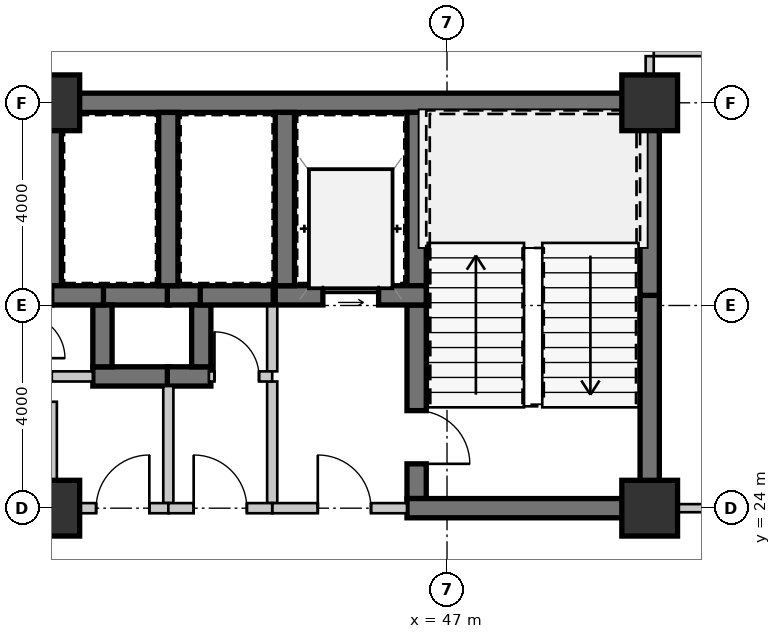
"""IFC4 building model, lengths in metres.
Left out: names, types, materials, properties, quantities, classifications, styles, units other than length and angle.
Written with IfcOpenShell. Run it as: python <this file> out.ifc"""

import sys

from ifc_helpers import new_model, si_unit, direction, frame, frame_2d, origin, origin_2d, place, context, subcontext, project, spatial, rectangle, extrude, source, transform, mapped, element, fill, save


model = new_model("IFC4")
c1 = context("Model", 3, precision=1e-05, world=origin(), true_north=direction((0.0, 1.0)))
c2 = subcontext(c1, "Body", "Model", "MODEL_VIEW")
j1 = project(units=[si_unit("LENGTHUNIT", "METRE"), si_unit("PLANEANGLEUNIT", "RADIAN")], contexts=[c1])
p1 = place(None, origin())
s1 = spatial("IfcSite", under=j1, at=p1, CompositionType="ELEMENT")
p2 = place(p1, origin())
s2 = spatial("IfcBuilding", under=s1, at=p2, CompositionType="ELEMENT")
p3 = place(p2, frame((0.0, 0.0, 12.95)))
s3 = spatial("IfcBuildingStorey", under=s2, at=p3, CompositionType="ELEMENT", Elevation=12.95)
m1 = source(origin(), c2, "Body", "SweptSolid", [
    extrude(rectangle(XDim=1.1, YDim=1.1, at=origin_2d()), origin(), (0.0, 0.0, 1.0), 3.85),
])
for number, where, z_axis, x_axis in (
    (1, (39.2, 24.0, 0.0), (0.0, 0.0, 1.0), (1.0, 0.0, 0.0)),
    (2, (51.0, 24.0, 0.0), (0.0, 0.0, 1.0), (1.0, 0.0, 0.0)),
    (3, (39.2, 32.0, 0.0), (0.0, 0.0, 1.0), (1.0, 0.0, 0.0)),
    (4, (51.0, 32.0, 0.0), (0.0, 0.0, 1.0), (1.0, 0.0, 0.0)),
):
    element("IfcColumn", number, at=place(p3, frame(where, z_axis=z_axis, x_axis=x_axis)), inside=s3, PredefinedType="COLUMN", context=c2, shape_type="MappedRepresentation", body=[
        mapped(m1, transform((0.0, 0.0, 0.0), scale=1.0)),
    ])
m2 = source(origin(), c2, "Body", "SweptSolid", [
    extrude(rectangle(XDim=11.2, YDim=0.38, at=frame_2d((5.6, 0.0))), origin(), (0.0, 0.0, 1.0), 3.43),
])
p4 = place(p3, frame((28.0, 32.0, 0.0), z_axis=(0.0, 0.0, 1.0), x_axis=(1.0, 0.0, 0.0)))
e5 = element("IfcWall", 5, at=p4, inside=s3, PredefinedType="SHEAR", context=c2, shape_type="MappedRepresentation", body=[
    mapped(m2, transform((0.0, 0.0, 0.0), scale=1.0)),
])
m3 = source(origin(), c2, "Body", "SweptSolid", [
    extrude(rectangle(XDim=11.99, YDim=0.38, at=frame_2d((5.995, 0.0))), origin(), (0.0, 0.0, 1.0), 3.43),
])
p5 = place(p3, frame((39.2, 32.0, 0.0), z_axis=(0.0, 0.0, 1.0), x_axis=(1.0, 0.0, 0.0)))
e6 = element("IfcWall", 6, at=p5, inside=s3, PredefinedType="SHEAR", context=c2, shape_type="MappedRepresentation", body=[
    mapped(m3, transform((0.0, 0.0, 0.0), scale=1.0)),
])
m4 = source(origin(), c2, "Body", "SweptSolid", [
    extrude(rectangle(XDim=4.01, YDim=0.38, at=frame_2d((2.005, 0.0))), origin(), (0.0, 0.0, 1.0), 3.43),
])
p6 = place(p3, frame((51.0, 24.19, 0.0), z_axis=(0.0, 0.0, 1.0), x_axis=(0.0, 1.0, 0.0)))
e7 = element("IfcWall", 7, at=p6, inside=s3, PredefinedType="SHEAR", context=c2, shape_type="MappedRepresentation", body=[
    mapped(m4, transform((0.0, 0.0, 0.0), scale=1.0)),
])
m5 = source(origin(), c2, "Body", "SweptSolid", [
    extrude(rectangle(XDim=3.61, YDim=0.38, at=frame_2d((1.805, 0.0))), origin(), (0.0, 0.0, 1.0), 3.43),
])
p7 = place(p3, frame((51.0, 28.2, 0.0), z_axis=(0.0, 0.0, 1.0), x_axis=(0.0, 1.0, 0.0)))
e8 = element("IfcWall", 8, at=p7, inside=s3, PredefinedType="SHEAR", context=c2, shape_type="MappedRepresentation", body=[
    mapped(m5, transform((0.0, 0.0, 0.0), scale=1.0)),
])
m6 = source(origin(), c2, "Body", "SweptSolid", [
    extrude(rectangle(XDim=3.42, YDim=0.38, at=frame_2d((1.71, 0.0))), origin(), (0.0, 0.0, 1.0), 3.43),
])
p8 = place(p3, frame((46.4, 31.81, 0.0), z_axis=(0.0, 0.0, 1.0), x_axis=(0.0, -1.0, 0.0)))
e9 = element("IfcWall", 9, at=p8, inside=s3, PredefinedType="SHEAR", context=c2, shape_type="MappedRepresentation", body=[
    mapped(m6, transform((0.0, 0.0, 0.0), scale=1.0)),
])
m7 = source(origin(), c2, "Body", "SweptSolid", [
    extrude(rectangle(XDim=3.82, YDim=0.38, at=frame_2d((1.91, 0.0))), origin(), (0.0, 0.0, 1.0), 3.43),
])
p9 = place(p3, frame((46.4, 28.01, 0.0), z_axis=(0.0, 0.0, 1.0), x_axis=(0.0, -1.0, 0.0)))
e10 = element("IfcWall", 10, at=p9, inside=s3, PredefinedType="SHEAR", context=c2, shape_type="MappedRepresentation", body=[
    mapped(m7, transform((0.0, 0.0, 0.0), scale=1.0)),
])
m8 = source(origin(), c2, "Body", "SweptSolid", [
    extrude(rectangle(XDim=1.05, YDim=2.1, at=frame_2d((0.525, 1.05))), frame((0.0, 0.2, 0.0), z_axis=(0.0, -1.0, 0.0), x_axis=(1.0, 0.0, 0.0)), (0.0, 0.0, 1.0), 0.4),
])
p10 = place(p9, frame((2.085, 0.0, 0.0)))
e11 = element("IfcOpeningElement", 11, at=p10, cuts=e10, PredefinedType="OPENING", context=c2, shape_type="MappedRepresentation", body=[
    mapped(m8, transform((0.0, 0.0, 0.0), scale=1.0)),
])
m9 = source(origin(), c2, "Body", "SweptSolid", [
    extrude(rectangle(XDim=4.98, YDim=0.38, at=frame_2d((2.49, 0.0))), origin(), (0.0, 0.0, 1.0), 3.43),
])
p11 = place(p3, frame((46.21, 24.0, 0.0), z_axis=(0.0, 0.0, 1.0), x_axis=(1.0, 0.0, 0.0)))
e12 = element("IfcWall", 12, at=p11, inside=s3, PredefinedType="SHEAR", context=c2, shape_type="MappedRepresentation", body=[
    mapped(m9, transform((0.0, 0.0, 0.0), scale=1.0)),
])
m10 = source(origin(), c2, "Body", "SweptSolid", [
    extrude(rectangle(XDim=2.98, YDim=0.38, at=frame_2d((1.49, 0.0))), origin(), (0.0, 0.0, 1.0), 3.43),
])
p12 = place(p3, frame((43.61, 28.2, 0.0), z_axis=(0.0, 0.0, 1.0), x_axis=(1.0, 0.0, 0.0)))
e13 = element("IfcWall", 13, at=p12, inside=s3, PredefinedType="SHEAR", context=c2, shape_type="MappedRepresentation", body=[
    mapped(m10, transform((0.0, 0.0, 0.0), scale=1.0)),
])
m11 = source(origin(), c2, "Body", "SweptSolid", [
    extrude(rectangle(XDim=1.1, YDim=2.15, at=frame_2d((0.55, 1.075))), frame((0.0, 0.2, 0.0), z_axis=(0.0, -1.0, 0.0), x_axis=(1.0, 0.0, 0.0)), (0.0, 0.0, 1.0), 0.4),
])
p13 = place(p12, frame((0.94, 0.0, 0.0)))
e14 = element("IfcOpeningElement", 14, at=p13, cuts=e13, PredefinedType="OPENING", context=c2, shape_type="MappedRepresentation", body=[
    mapped(m11, transform((0.0, 0.0, 0.0), scale=1.0)),
])
p14 = place(p3, frame((43.8, 31.81, 0.0), z_axis=(0.0, 0.0, 1.0), x_axis=(0.0, -1.0, 0.0)))
e15 = element("IfcWall", 15, at=p14, inside=s3, PredefinedType="SHEAR", context=c2, shape_type="MappedRepresentation", body=[
    mapped(m6, transform((0.0, 0.0, 0.0), scale=1.0)),
])
m12 = source(origin(), c2, "Body", "SweptSolid", [
    extrude(rectangle(XDim=2.4, YDim=0.2, at=frame_2d((1.2, 0.0))), origin(), (0.0, 0.0, 1.0), 3.43),
])
p15 = place(p3, frame((43.55, 26.5, 0.0), z_axis=(0.0, 0.0, 1.0), x_axis=(0.0, -1.0, 0.0)))
e16 = element("IfcWall", 16, at=p15, inside=s3, PredefinedType="SOLIDWALL", context=c2, shape_type="MappedRepresentation", body=[
    mapped(m12, transform((0.0, 0.0, 0.0), scale=1.0)),
])
m13 = source(origin(), c2, "Body", "SweptSolid", [
    extrude(rectangle(XDim=1.31, YDim=0.2, at=frame_2d((0.655, 0.0))), origin(), (0.0, 0.0, 1.0), 3.43),
])
p16 = place(p3, frame((43.55, 28.01, 0.0), z_axis=(0.0, 0.0, 1.0), x_axis=(0.0, -1.0, 0.0)))
e17 = element("IfcWall", 17, at=p16, inside=s3, PredefinedType="SOLIDWALL", context=c2, shape_type="MappedRepresentation", body=[
    mapped(m13, transform((0.0, 0.0, 0.0), scale=1.0)),
])
m14 = source(origin(), c2, "Body", "SweptSolid", [
    extrude(rectangle(XDim=2.66, YDim=0.2, at=frame_2d((1.33, 0.0))), origin(), (0.0, 0.0, 1.0), 2.897),
])
p17 = place(p3, frame((43.55, 24.0, 0.0), z_axis=(0.0, 0.0, 1.0), x_axis=(1.0, 0.0, 0.0)))
e18 = element("IfcWall", 18, at=p17, inside=s3, PredefinedType="SOLIDWALL", context=c2, shape_type="MappedRepresentation", body=[
    mapped(m14, transform((0.0, 0.0, 0.0), scale=1.0)),
])
m15 = source(origin(), c2, "Body", "SweptSolid", [
    extrude(rectangle(XDim=1.05, YDim=2.1, at=frame_2d((0.525, 1.05))), frame((0.0, 0.11, 0.0), z_axis=(0.0, -1.0, 0.0), x_axis=(1.0, 0.0, 0.0)), (0.0, 0.0, 1.0), 0.22),
])
p18 = place(p17, frame((0.9, 0.0, 0.0)))
e19 = element("IfcOpeningElement", 19, at=p18, cuts=e18, PredefinedType="OPENING", context=c2, shape_type="MappedRepresentation", body=[
    mapped(m15, transform((0.0, 0.0, 0.0), scale=1.0)),
])
m16 = source(origin(), c2, "Body", "SweptSolid", [
    extrude(rectangle(XDim=1.32, YDim=0.38, at=frame_2d((0.66, 0.0))), origin(), (0.0, 0.0, 1.0), 3.43),
])
p19 = place(p3, frame((41.52, 28.2, 0.0), z_axis=(0.0, 0.0, 1.0), x_axis=(-1.0, 0.0, 0.0)))
e20 = element("IfcWall", 20, at=p19, inside=s3, PredefinedType="SHEAR", context=c2, shape_type="MappedRepresentation", body=[
    mapped(m16, transform((0.0, 0.0, 0.0), scale=1.0)),
])
m17 = source(origin(), c2, "Body", "SweptSolid", [
    extrude(rectangle(XDim=0.67, YDim=0.38, at=frame_2d((0.335, 0.0))), origin(), (0.0, 0.0, 1.0), 3.43),
])
p20 = place(p3, frame((42.15, 28.2, 0.0), z_axis=(0.0, 0.0, 1.0), x_axis=(-1.0, 0.0, 0.0)))
e21 = element("IfcWall", 21, at=p20, inside=s3, PredefinedType="SHEAR", context=c2, shape_type="MappedRepresentation", body=[
    mapped(m17, transform((0.0, 0.0, 0.0), scale=1.0)),
])
m18 = source(origin(), c2, "Body", "SweptSolid", [
    extrude(rectangle(XDim=1.51, YDim=0.38, at=frame_2d((0.755, 0.0))), origin(), (0.0, 0.0, 1.0), 3.43),
])
p21 = place(p3, frame((40.01, 26.6, 0.0), z_axis=(0.0, 0.0, 1.0), x_axis=(1.0, 0.0, 0.0)))
e22 = element("IfcWall", 22, at=p21, inside=s3, PredefinedType="SHEAR", context=c2, shape_type="MappedRepresentation", body=[
    mapped(m18, transform((0.0, 0.0, 0.0), scale=1.0)),
])
m19 = source(origin(), c2, "Body", "SweptSolid", [
    extrude(rectangle(XDim=1.22, YDim=0.38, at=frame_2d((0.61, 0.0))), origin(), (0.0, 0.0, 1.0), 3.43),
])
p22 = place(p3, frame((40.2, 28.01, 0.0), z_axis=(0.0, 0.0, 1.0), x_axis=(0.0, -1.0, 0.0)))
e23 = element("IfcWall", 23, at=p22, inside=s3, PredefinedType="SHEAR", context=c2, shape_type="MappedRepresentation", body=[
    mapped(m19, transform((0.0, 0.0, 0.0), scale=1.0)),
])
m20 = source(origin(), c2, "Body", "SweptSolid", [
    extrude(rectangle(XDim=0.86, YDim=0.38, at=frame_2d((0.43, 0.0))), origin(), (0.0, 0.0, 1.0), 3.43),
])
p23 = place(p3, frame((41.48, 26.6, 0.0), z_axis=(0.0, 0.0, 1.0), x_axis=(1.0, 0.0, 0.0)))
e24 = element("IfcWall", 24, at=p23, inside=s3, PredefinedType="SHEAR", context=c2, shape_type="MappedRepresentation", body=[
    mapped(m20, transform((0.0, 0.0, 0.0), scale=1.0)),
])
p24 = place(p3, frame((42.15, 26.79, 0.0), z_axis=(0.0, 0.0, 1.0), x_axis=(0.0, 1.0, 0.0)))
e25 = element("IfcWall", 25, at=p24, inside=s3, PredefinedType="SHEAR", context=c2, shape_type="MappedRepresentation", body=[
    mapped(m19, transform((0.0, 0.0, 0.0), scale=1.0)),
])
p25 = place(p3, frame((39.2, 28.39, 0.0), z_axis=(0.0, 0.0, 1.0), x_axis=(0.0, 1.0, 0.0)))
e26 = element("IfcWall", 26, at=p25, inside=s3, PredefinedType="SHEAR", context=c2, shape_type="MappedRepresentation", body=[
    mapped(m6, transform((0.0, 0.0, 0.0), scale=1.0)),
])
m21 = source(origin(), c2, "Body", "SweptSolid", [
    extrude(rectangle(XDim=0.62, YDim=0.38, at=frame_2d((0.31, 0.0))), origin(), (0.0, 0.0, 1.0), 3.43),
])
p26 = place(p3, frame((38.58, 28.2, 0.0), z_axis=(0.0, 0.0, 1.0), x_axis=(1.0, 0.0, 0.0)))
e27 = element("IfcWall", 27, at=p26, inside=s3, PredefinedType="SHEAR", context=c2, shape_type="MappedRepresentation", body=[
    mapped(m21, transform((0.0, 0.0, 0.0), scale=1.0)),
])
p27 = place(p3, frame((41.5, 28.39, 0.0), z_axis=(0.0, 0.0, 1.0), x_axis=(0.0, 1.0, 0.0)))
e28 = element("IfcWall", 28, at=p27, inside=s3, PredefinedType="SHEAR", context=c2, shape_type="MappedRepresentation", body=[
    mapped(m6, transform((0.0, 0.0, 0.0), scale=1.0)),
])
m22 = source(origin(), c2, "Body", "SweptSolid", [
    extrude(rectangle(XDim=1.02, YDim=0.38, at=frame_2d((0.51, 0.0))), origin(), (0.0, 0.0, 1.0), 3.43),
])
p28 = place(p3, frame((39.2, 28.2, 0.0), z_axis=(0.0, 0.0, 1.0), x_axis=(1.0, 0.0, 0.0)))
e29 = element("IfcWall", 29, at=p28, inside=s3, PredefinedType="SHEAR", context=c2, shape_type="MappedRepresentation", body=[
    mapped(m22, transform((0.0, 0.0, 0.0), scale=1.0)),
])
m23 = source(origin(), c2, "Body", "SweptSolid", [
    extrude(rectangle(XDim=1.44, YDim=0.38, at=frame_2d((0.72, 0.0))), origin(), (0.0, 0.0, 1.0), 3.43),
])
p29 = place(p3, frame((42.13, 28.2, 0.0), z_axis=(0.0, 0.0, 1.0), x_axis=(1.0, 0.0, 0.0)))
e30 = element("IfcWall", 30, at=p29, inside=s3, PredefinedType="SHEAR", context=c2, shape_type="MappedRepresentation", body=[
    mapped(m23, transform((0.0, 0.0, 0.0), scale=1.0)),
])
m24 = source(origin(), c2, "Body", "SweptSolid", [
    extrude(rectangle(XDim=2.0, YDim=0.2, at=frame_2d((1.0, 0.0))), origin(), (0.0, 0.0, 1.0), 2.97),
])
p30 = place(p3, frame((39.2, 26.1, 0.0), z_axis=(0.0, 0.0, 1.0), x_axis=(0.0, -1.0, 0.0)))
e31 = element("IfcWall", 31, at=p30, inside=s3, PredefinedType="SOLIDWALL", context=c2, shape_type="MappedRepresentation", body=[
    mapped(m24, transform((0.0, 0.0, 0.0), scale=1.0)),
])
m25 = source(origin(), c2, "Body", "SweptSolid", [
    extrude(rectangle(XDim=0.81, YDim=0.2, at=frame_2d((0.405, 0.0))), origin(), (0.0, 0.0, 1.0), 3.43),
])
p31 = place(p3, frame((39.2, 26.6, 0.0), z_axis=(0.0, 0.0, 1.0), x_axis=(1.0, 0.0, 0.0)))
e32 = element("IfcWall", 32, at=p31, inside=s3, PredefinedType="SOLIDWALL", context=c2, shape_type="MappedRepresentation", body=[
    mapped(m25, transform((0.0, 0.0, 0.0), scale=1.0)),
])
m26 = source(origin(), c2, "Body", "SweptSolid", [
    extrude(rectangle(XDim=2.31, YDim=0.2, at=frame_2d((1.155, 0.0))), origin(), (0.0, 0.0, 1.0), 3.43),
])
p32 = place(p3, frame((41.5, 26.41, 0.0), z_axis=(0.0, 0.0, 1.0), x_axis=(0.0, -1.0, 0.0)))
e33 = element("IfcWall", 33, at=p32, inside=s3, PredefinedType="SOLIDWALL", context=c2, shape_type="MappedRepresentation", body=[
    mapped(m26, transform((0.0, 0.0, 0.0), scale=1.0)),
])
m27 = source(origin(), c2, "Body", "SweptSolid", [
    extrude(rectangle(XDim=2.3, YDim=0.2, at=frame_2d((1.15, 0.0))), origin(), (0.0, 0.0, 1.0), 2.897),
])
p33 = place(p3, frame((41.5, 24.0, 0.0), z_axis=(0.0, 0.0, 1.0), x_axis=(-1.0, 0.0, 0.0)))
e34 = element("IfcWall", 34, at=p33, inside=s3, PredefinedType="SOLIDWALL", context=c2, shape_type="MappedRepresentation", body=[
    mapped(m27, transform((0.0, 0.0, 0.0), scale=1.0)),
])
p34 = place(p33, frame((0.375, 0.0, 0.0)))
e35 = element("IfcOpeningElement", 35, at=p34, cuts=e34, PredefinedType="OPENING", context=c2, shape_type="MappedRepresentation", body=[
    mapped(m15, transform((0.0, 0.0, 0.0), scale=1.0)),
])
m28 = source(origin(), c2, "Body", "SweptSolid", [
    extrude(rectangle(XDim=1.25, YDim=0.2, at=frame_2d((0.625, 0.0))), origin(), (0.0, 0.0, 1.0), 3.43),
])
p35 = place(p3, frame((42.3, 26.6, 0.0), z_axis=(0.0, 0.0, 1.0), x_axis=(1.0, 0.0, 0.0)))
e36 = element("IfcWall", 36, at=p35, inside=s3, PredefinedType="SOLIDWALL", context=c2, shape_type="MappedRepresentation", body=[
    mapped(m28, transform((0.0, 0.0, 0.0), scale=1.0)),
])
m29 = source(origin(), c2, "Body", "SweptSolid", [
    extrude(rectangle(XDim=0.88, YDim=2.1, at=frame_2d((0.44, 1.05))), frame((0.0, 0.11, 0.0), z_axis=(0.0, -1.0, 0.0), x_axis=(1.0, 0.0, 0.0)), (0.0, 0.0, 1.0), 0.22),
])
p36 = place(p35, frame((0.11, 0.0, 0.0)))
e37 = element("IfcOpeningElement", 37, at=p36, cuts=e36, PredefinedType="OPENING", context=c2, shape_type="MappedRepresentation", body=[
    mapped(m29, transform((0.0, 0.0, 0.0), scale=1.0)),
])
m30 = source(origin(), c2, "Body", "SweptSolid", [
    extrude(rectangle(XDim=2.05, YDim=0.2, at=frame_2d((1.025, 0.0))), origin(), (0.0, 0.0, 1.0), 2.897),
])
p37 = place(p3, frame((43.55, 24.0, 0.0), z_axis=(0.0, 0.0, 1.0), x_axis=(-1.0, 0.0, 0.0)))
e38 = element("IfcWall", 38, at=p37, inside=s3, PredefinedType="SOLIDWALL", context=c2, shape_type="MappedRepresentation", body=[
    mapped(m30, transform((0.0, 0.0, 0.0), scale=1.0)),
])
p38 = place(p37, frame((0.5, 0.0, 0.0)))
e39 = element("IfcOpeningElement", 39, at=p38, cuts=e38, PredefinedType="OPENING", context=c2, shape_type="MappedRepresentation", body=[
    mapped(m15, transform((0.0, 0.0, 0.0), scale=1.0)),
])
m31 = source(origin(), c2, "Body", "SweptSolid", [
    extrude(rectangle(XDim=4.29, YDim=0.16, at=frame_2d((2.145, 0.0))), origin(), (0.0, 0.0, 1.0), 3.43),
])
p39 = place(p3, frame((51.19, 24.0, 0.0), z_axis=(0.0, 0.0, 1.0), x_axis=(1.0, 0.0, 0.0)))
e40 = element("IfcWall", 40, at=p39, inside=s3, PredefinedType="PARTITIONING", context=c2, shape_type="MappedRepresentation", body=[
    mapped(m31, transform((0.0, 0.0, 0.0), scale=1.0)),
])
m32 = source(origin(), c2, "Body", "SweptSolid", [
    extrude(rectangle(XDim=4.34, YDim=0.16, at=frame_2d((2.17, 0.0))), origin(), (0.0, 0.0, 1.0), 3.43),
])
p40 = place(p3, frame((51.08, 33.0, 0.0), z_axis=(0.0, 0.0, 1.0), x_axis=(1.0, 0.0, 0.0)))
e41 = element("IfcWall", 41, at=p40, inside=s3, PredefinedType="PARTITIONING", context=c2, shape_type="MappedRepresentation", body=[
    mapped(m32, transform((0.0, 0.0, 0.0), scale=1.0)),
])
m33 = source(origin(), c2, "Body", "SweptSolid", [
    extrude(rectangle(XDim=0.73, YDim=0.16, at=frame_2d((0.365, 0.0))), origin(), (0.0, 0.0, 1.0), 3.43),
])
p41 = place(p3, frame((51.0, 32.19, 0.0), z_axis=(0.0, 0.0, 1.0), x_axis=(0.0, 1.0, 0.0)))
e42 = element("IfcWall", 42, at=p41, inside=s3, PredefinedType="PARTITIONING", context=c2, shape_type="MappedRepresentation", body=[
    mapped(m33, transform((0.0, 0.0, 0.0), scale=1.0)),
])
m34 = source(origin(), c2, "Body", "SweptSolid", [
    extrude(rectangle(XDim=1.05, YDim=2.1, at=frame_2d((0.525, 1.05))), frame((0.0, 0.025, 0.0), z_axis=(0.0, -1.0, 0.0), x_axis=(1.0, 0.0, 0.0)), (0.0, 0.0, 1.0), 0.05),
])
p42 = place(p10, origin())
e43 = element("IfcDoor", 43, at=p42, inside=s3, OperationType="SINGLE_SWING_RIGHT", PredefinedType="DOOR", context=c2, shape_type="MappedRepresentation", body=[
    mapped(m34, transform((0.0, 0.0, 0.0), scale=1.0)),
])
fill(e11, e43)
m35 = source(origin(), c2, "Body", "SweptSolid", [
    extrude(rectangle(XDim=1.1, YDim=2.15, at=frame_2d((0.55, 1.075))), frame((0.0, 0.025, 0.0), z_axis=(0.0, -1.0, 0.0), x_axis=(1.0, 0.0, 0.0)), (0.0, 0.0, 1.0), 0.05),
])
p43 = place(p13, origin())
e44 = element("IfcDoor", 44, at=p43, inside=s3, OperationType="SLIDING_TO_LEFT", PredefinedType="DOOR", context=c2, shape_type="MappedRepresentation", body=[
    mapped(m35, transform((0.0, 0.0, 0.0), scale=1.0)),
])
fill(e14, e44)
p44 = place(p18, origin())
e45 = element("IfcDoor", 45, at=p44, inside=s3, OperationType="SINGLE_SWING_LEFT", PredefinedType="DOOR", context=c2, shape_type="MappedRepresentation", body=[
    mapped(m34, transform((0.0, 0.0, 0.0), scale=1.0)),
])
fill(e19, e45)
p45 = place(p34, frame((1.05, 0.0, 0.0), z_axis=(0.0, 0.0, 1.0), x_axis=(-1.0, 0.0, 0.0)))
e46 = element("IfcDoor", 46, at=p45, inside=s3, OperationType="SINGLE_SWING_RIGHT", PredefinedType="DOOR", context=c2, shape_type="MappedRepresentation", body=[
    mapped(m34, transform((0.0, 0.0, 0.0), scale=1.0)),
])
fill(e35, e46)
m36 = source(origin(), c2, "Body", "SweptSolid", [
    extrude(rectangle(XDim=0.88, YDim=2.1, at=frame_2d((0.44, 1.05))), frame((0.0, 0.025, 0.0), z_axis=(0.0, -1.0, 0.0), x_axis=(1.0, 0.0, 0.0)), (0.0, 0.0, 1.0), 0.05),
])
p46 = place(p36, origin())
e47 = element("IfcDoor", 47, at=p46, inside=s3, OperationType="SINGLE_SWING_LEFT", PredefinedType="DOOR", context=c2, shape_type="MappedRepresentation", body=[
    mapped(m36, transform((0.0, 0.0, 0.0), scale=1.0)),
])
fill(e37, e47)
p47 = place(p38, frame((1.05, 0.0, 0.0), z_axis=(0.0, 0.0, 1.0), x_axis=(-1.0, 0.0, 0.0)))
e48 = element("IfcDoor", 48, at=p47, inside=s3, OperationType="SINGLE_SWING_LEFT", PredefinedType="DOOR", context=c2, shape_type="MappedRepresentation", body=[
    mapped(m34, transform((0.0, 0.0, 0.0), scale=1.0)),
])
fill(e39, e48)
save(model, sys.argv[1])
